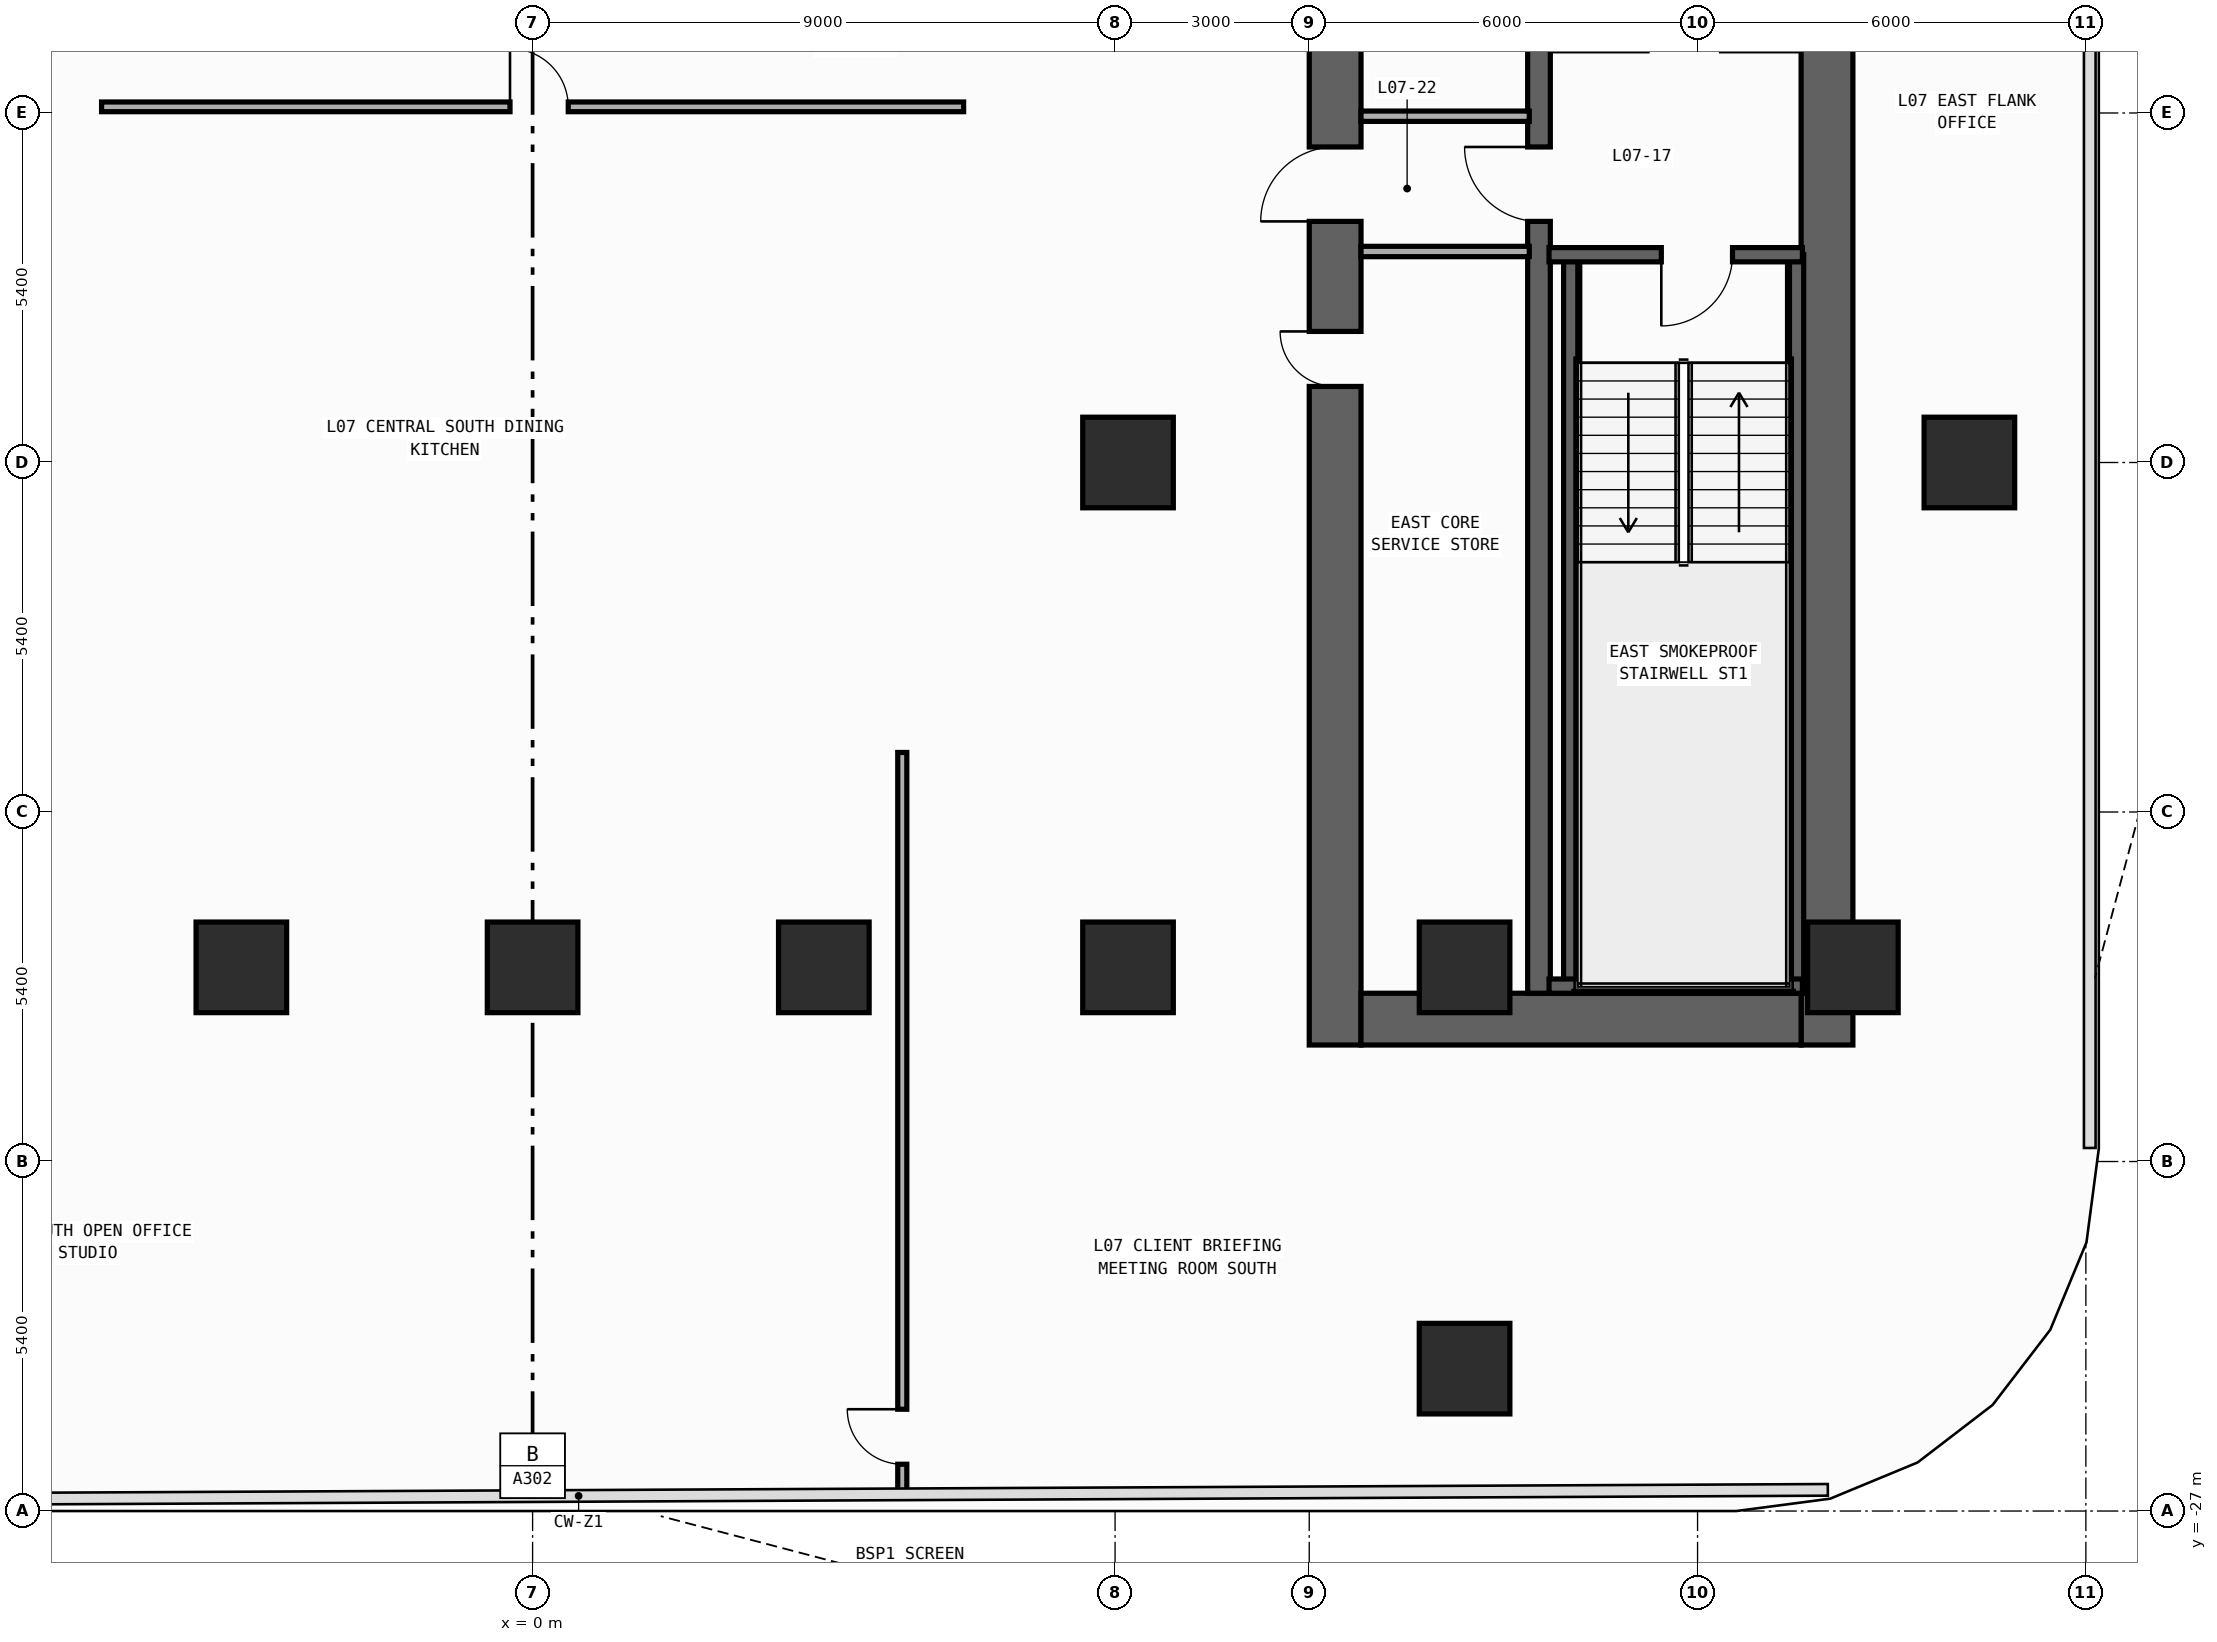
"""IFC4 building model, lengths in metres.
Left out: names, types, materials, properties, quantities, classifications, styles, units other than length and angle.
Written with IfcOpenShell. Run it as: python <this file> out.ifc"""

import sys

from ifc_helpers import new_model, si_unit, direction, frame, frame_2d, origin, origin_2d, place, context, subcontext, project, spatial, rectangle, extrude, element, fill, save


model = new_model("IFC4")
c1 = context("Model", 3, precision=1e-05, world=origin(), true_north=direction((0.0, 1.0)))
c2 = subcontext(c1, "Body", "Model", "MODEL_VIEW")
j1 = project(units=[si_unit("LENGTHUNIT", "METRE"), si_unit("PLANEANGLEUNIT", "RADIAN")], contexts=[c1])
p1 = place(None, origin())
s1 = spatial("IfcSite", under=j1, at=p1, CompositionType="ELEMENT")
p2 = place(p1, origin())
s2 = spatial("IfcBuilding", under=s1, at=p2, CompositionType="ELEMENT")
p3 = place(p2, frame((0.0, 0.0, 30.2)))
s3 = spatial("IfcBuildingStorey", under=s2, at=p3, CompositionType="ELEMENT", Elevation=30.2)
p4 = place(p3, frame((12.4, -19.8, 0.0), z_axis=(0.0, 0.0, 1.0), x_axis=(0.0, 1.0, 0.0)))
e1 = element("IfcWall", 1, at=p4, inside=s3, PredefinedType="SHEAR", context=c2, shape_type="SweptSolid", body=[
    extrude(rectangle(XDim=27.0, YDim=0.8, at=frame_2d((13.5, 0.0))), origin(), (0.0, 0.0, 1.0), 3.94),
])
p5 = place(p4, frame((23.05, 0.0, 0.0)))
e2 = element("IfcOpeningElement", 2, at=p5, cuts=e1, PredefinedType="OPENING", context=c2, shape_type="SweptSolid", body=[
    extrude(rectangle(XDim=1.1, YDim=2.2, at=frame_2d((0.55, 1.1))), frame((0.0, 0.41, 0.0), z_axis=(0.0, -1.0, 0.0), x_axis=(1.0, 0.0, 0.0)), (0.0, 0.0, 1.0), 0.82),
])
p6 = place(p4, frame((19.85, 0.0, 0.0)))
e3 = element("IfcOpeningElement", 3, at=p6, cuts=e1, PredefinedType="OPENING", context=c2, shape_type="SweptSolid", body=[
    extrude(rectangle(XDim=1.1, YDim=2.2, at=frame_2d((0.55, 1.1))), frame((0.0, 0.41, 0.0), z_axis=(0.0, -1.0, 0.0), x_axis=(1.0, 0.0, 0.0)), (0.0, 0.0, 1.0), 0.82),
])
p7 = place(p4, frame((16.65, 0.0, 0.0)))
e4 = element("IfcOpeningElement", 4, at=p7, cuts=e1, PredefinedType="OPENING", context=c2, shape_type="SweptSolid", body=[
    extrude(rectangle(XDim=1.1, YDim=2.2, at=frame_2d((0.55, 1.1))), frame((0.0, 0.41, 0.0), z_axis=(0.0, -1.0, 0.0), x_axis=(1.0, 0.0, 0.0)), (0.0, 0.0, 1.0), 0.82),
])
p8 = place(p4, frame((10.175, 0.0, 0.0)))
e5 = element("IfcOpeningElement", 5, at=p8, cuts=e1, PredefinedType="OPENING", context=c2, shape_type="SweptSolid", body=[
    extrude(rectangle(XDim=0.85, YDim=2.1, at=frame_2d((0.425, 1.05))), frame((0.0, 0.41, 0.0), z_axis=(0.0, -1.0, 0.0), x_axis=(1.0, 0.0, 0.0)), (0.0, 0.0, 1.0), 0.82),
])
p9 = place(p4, frame((12.725, 0.0, 0.0)))
e6 = element("IfcOpeningElement", 6, at=p9, cuts=e1, PredefinedType="OPENING", context=c2, shape_type="SweptSolid", body=[
    extrude(rectangle(XDim=1.15, YDim=2.2, at=frame_2d((0.575, 1.1))), frame((0.0, 0.41, 0.0), z_axis=(0.0, -1.0, 0.0), x_axis=(1.0, 0.0, 0.0)), (0.0, 0.0, 1.0), 0.82),
])
p10 = place(p4, frame((25.125, 0.0, 0.0)))
e7 = element("IfcOpeningElement", 7, at=p10, cuts=e1, PredefinedType="OPENING", context=c2, shape_type="SweptSolid", body=[
    extrude(rectangle(XDim=0.85, YDim=2.1, at=frame_2d((0.425, 1.05))), frame((0.0, 0.41, 0.0), z_axis=(0.0, -1.0, 0.0), x_axis=(1.0, 0.0, 0.0)), (0.0, 0.0, 1.0), 0.82),
])
p11 = place(p3, frame((20.0, -19.8, 0.0), z_axis=(0.0, 0.0, 1.0), x_axis=(0.0, 1.0, 0.0)))
e8 = element("IfcWall", 8, at=p11, inside=s3, PredefinedType="SHEAR", context=c2, shape_type="SweptSolid", body=[
    extrude(rectangle(XDim=27.0, YDim=0.8, at=frame_2d((13.5, 0.0))), origin(), (0.0, 0.0, 1.0), 3.94),
])
p12 = place(p3, frame((12.8, -19.4, 0.0), z_axis=(0.0, 0.0, 1.0), x_axis=(1.0, 0.0, 0.0)))
e9 = element("IfcWall", 9, at=p12, inside=s3, PredefinedType="SHEAR", context=c2, shape_type="SweptSolid", body=[
    extrude(rectangle(XDim=6.8, YDim=0.8, at=frame_2d((3.4, 0.0))), origin(), (0.0, 0.0, 1.0), 3.94),
])
p13 = place(p3, frame((15.55, -19.0, 0.0), z_axis=(0.0, 0.0, 1.0), x_axis=(0.0, 1.0, 0.0)))
e10 = element("IfcWall", 10, at=p13, inside=s3, PredefinedType="SHEAR", context=c2, shape_type="SweptSolid", body=[
    extrude(rectangle(XDim=25.4, YDim=0.35, at=frame_2d((12.7, 0.0))), origin(), (0.0, 0.0, 1.0), 3.94),
])
p14 = place(p13, frame((11.925, 0.0, 0.0)))
e11 = element("IfcOpeningElement", 11, at=p14, cuts=e10, PredefinedType="OPENING", context=c2, shape_type="SweptSolid", body=[
    extrude(rectangle(XDim=1.15, YDim=2.2, at=frame_2d((0.575, 1.1))), frame((0.0, 0.185, 0.0), z_axis=(0.0, -1.0, 0.0), x_axis=(1.0, 0.0, 0.0)), (0.0, 0.0, 1.0), 0.37),
])
p15 = place(p13, frame((24.325, 0.0, 0.0)))
e12 = element("IfcOpeningElement", 12, at=p15, cuts=e10, PredefinedType="OPENING", context=c2, shape_type="SweptSolid", body=[
    extrude(rectangle(XDim=0.85, YDim=2.1, at=frame_2d((0.425, 1.05))), frame((0.0, 0.185, 0.0), z_axis=(0.0, -1.0, 0.0), x_axis=(1.0, 0.0, 0.0)), (0.0, 0.0, 1.0), 0.37),
])
for number, where, z_axis, x_axis in (
    (13, (16.04, -18.89, 0.0), (0.0, 0.0, 1.0), (0.0, 1.0, 0.0)),
    (14, (19.53, -18.89, 0.0), (0.0, 0.0, 1.0), (0.0, 1.0, 0.0)),
):
    element("IfcWall", number, at=place(p3, frame(where, z_axis=z_axis, x_axis=x_axis)), inside=s3, PredefinedType="SHEAR", context=c2, shape_type="SweptSolid", body=[
        extrude(rectangle(XDim=11.3, YDim=0.22, at=frame_2d((5.65, 0.0))), origin(), (0.0, 0.0, 1.0), 3.94),
    ])
p16 = place(p3, frame((15.705, -18.89, 0.0), z_axis=(0.0, 0.0, 1.0), x_axis=(1.0, 0.0, 0.0)))
e15 = element("IfcWall", 15, at=p16, inside=s3, PredefinedType="SHEAR", context=c2, shape_type="SweptSolid", body=[
    extrude(rectangle(XDim=3.915, YDim=0.22, at=frame_2d((1.958, 0.0))), origin(), (0.0, 0.0, 1.0), 3.94),
])
p17 = place(p3, frame((19.62, -7.59, 0.0), z_axis=(0.0, 0.0, 1.0), x_axis=(-1.0, 0.0, 0.0)))
e16 = element("IfcWall", 16, at=p17, inside=s3, PredefinedType="SHEAR", context=c2, shape_type="SweptSolid", body=[
    extrude(rectangle(XDim=3.915, YDim=0.22, at=frame_2d((1.958, 0.0))), origin(), (0.0, 0.0, 1.0), 3.94),
])
p18 = place(p17, frame((1.08, 0.0, 0.0)))
e17 = element("IfcOpeningElement", 17, at=p18, cuts=e16, PredefinedType="OPENING", context=c2, shape_type="SweptSolid", body=[
    extrude(rectangle(XDim=1.1, YDim=2.2, at=frame_2d((0.55, 1.1))), frame((0.0, 0.12, 0.0), z_axis=(0.0, -1.0, 0.0), x_axis=(1.0, 0.0, 0.0)), (0.0, 0.0, 1.0), 0.24),
])
for number, where, z_axis, x_axis in (
    (18, (9.2, -18.6, 0.0), (0.0, 0.0, 1.0), (1.0, 0.0, 0.0)),
    (19, (9.2, -10.8, 0.0), (0.0, 0.0, 1.0), (1.0, 0.0, 0.0)),
    (20, (20.4, -18.6, 0.0), (0.0, 0.0, 1.0), (1.0, 0.0, 0.0)),
    (21, (14.4, -18.6, 0.0), (0.0, 0.0, 1.0), (1.0, 0.0, 0.0)),
    (22, (-4.5, -18.6, 0.0), (0.0, 0.0, 1.0), (1.0, 0.0, 0.0)),
    (23, (0.0, -18.6, 0.0), (0.0, 0.0, 1.0), (1.0, 0.0, 0.0)),
    (24, (4.5, -18.6, 0.0), (0.0, 0.0, 1.0), (1.0, 0.0, 0.0)),
    (25, (22.2, -10.8, 0.0), (0.0, 0.0, 1.0), (1.0, 0.0, 0.0)),
    (26, (14.4, -24.8, 0.0), (0.0, 0.0, 1.0), (1.0, 0.0, 0.0)),
):
    element("IfcColumn", number, at=place(p3, frame(where, z_axis=z_axis, x_axis=x_axis)), inside=s3, PredefinedType="COLUMN", context=c2, shape_type="SweptSolid", body=[
        extrude(rectangle(XDim=1.4, YDim=1.4, at=origin_2d()), origin(), (0.0, 0.0, 1.0), 4.2),
    ])
for number, where, z_axis, x_axis in (
    (27, (12.8, -5.45, 0.0), (0.0, 0.0, 1.0), (1.0, 0.0, 0.0)),
    (28, (12.8, -7.54, 0.0), (0.0, 0.0, 1.0), (1.0, 0.0, 0.0)),
):
    element("IfcWall", number, at=place(p3, frame(where, z_axis=z_axis, x_axis=x_axis)), inside=s3, PredefinedType="STANDARD", context=c2, shape_type="SweptSolid", body=[
        extrude(rectangle(XDim=2.6, YDim=0.16, at=frame_2d((1.3, 0.0))), origin(), (0.0, 0.0, 1.0), 3.94),
    ])
p19 = place(p3, frame((-6.66, -5.305, 0.0), z_axis=(0.0, 0.0, 1.0), x_axis=(1.0, 0.0, 0.0)))
e29 = element("IfcWall", 29, at=p19, inside=s3, PredefinedType="PARTITIONING", context=c2, shape_type="SweptSolid", body=[
    extrude(rectangle(XDim=13.32, YDim=0.15, at=frame_2d((6.66, 0.0))), origin(), (0.0, 0.0, 1.0), 3.94),
])
p20 = place(p19, frame((6.311, 0.0, 0.0)))
e30 = element("IfcOpeningElement", 30, at=p20, cuts=e29, PredefinedType="OPENING", context=c2, shape_type="SweptSolid", body=[
    extrude(rectangle(XDim=0.9, YDim=2.15, at=frame_2d((0.45, 1.075))), frame((0.0, 0.085, 0.0), z_axis=(0.0, -1.0, 0.0), x_axis=(1.0, 0.0, 0.0)), (0.0, 0.0, 1.0), 0.17),
])
p21 = place(p3, frame((5.712, -26.737, 0.0), z_axis=(0.0, 0.0, 1.0), x_axis=(0.0, 1.0, 0.0)))
e31 = element("IfcWall", 31, at=p21, inside=s3, PredefinedType="PARTITIONING", context=c2, shape_type="SweptSolid", body=[
    extrude(rectangle(XDim=11.457, YDim=0.14, at=frame_2d((5.729, 0.0))), origin(), (0.0, 0.0, 1.0), 3.94),
])
p22 = place(p21, frame((0.46, 0.0, 0.0)))
e32 = element("IfcOpeningElement", 32, at=p22, cuts=e31, PredefinedType="OPENING", context=c2, shape_type="SweptSolid", body=[
    extrude(rectangle(XDim=0.85, YDim=2.1, at=frame_2d((0.425, 1.05))), frame((0.0, 0.08, 0.0), z_axis=(0.0, -1.0, 0.0), x_axis=(1.0, 0.0, 0.0)), (0.0, 0.0, 1.0), 0.16),
])
p23 = place(p18, origin())
e33 = element("IfcDoor", 33, at=p23, inside=s3, OperationType="SINGLE_SWING_RIGHT", PredefinedType="DOOR", context=c2, shape_type="SweptSolid", body=[
    extrude(rectangle(XDim=1.1, YDim=2.2, at=frame_2d((0.55, 1.1))), frame((0.0, 0.025, 0.0), z_axis=(0.0, -1.0, 0.0), x_axis=(1.0, 0.0, 0.0)), (0.0, 0.0, 1.0), 0.05),
])
fill(e17, e33)
p24 = place(p8, origin())
e34 = element("IfcDoor", 34, at=p24, inside=s3, OperationType="SINGLE_SWING_RIGHT", PredefinedType="DOOR", context=c2, shape_type="SweptSolid", body=[
    extrude(rectangle(XDim=0.85, YDim=2.1, at=frame_2d((0.425, 1.05))), frame((0.0, 0.025, 0.0), z_axis=(0.0, -1.0, 0.0), x_axis=(1.0, 0.0, 0.0)), (0.0, 0.0, 1.0), 0.05),
])
fill(e5, e34)
p25 = place(p9, origin())
e35 = element("IfcDoor", 35, at=p25, inside=s3, OperationType="SINGLE_SWING_LEFT", PredefinedType="DOOR", context=c2, shape_type="SweptSolid", body=[
    extrude(rectangle(XDim=1.15, YDim=2.2, at=frame_2d((0.575, 1.1))), frame((0.0, 0.025, 0.0), z_axis=(0.0, -1.0, 0.0), x_axis=(1.0, 0.0, 0.0)), (0.0, 0.0, 1.0), 0.05),
])
fill(e6, e35)
p26 = place(p14, origin())
e36 = element("IfcDoor", 36, at=p26, inside=s3, OperationType="SINGLE_SWING_RIGHT", PredefinedType="DOOR", context=c2, shape_type="SweptSolid", body=[
    extrude(rectangle(XDim=1.15, YDim=2.2, at=frame_2d((0.575, 1.1))), frame((0.0, 0.025, 0.0), z_axis=(0.0, -1.0, 0.0), x_axis=(1.0, 0.0, 0.0)), (0.0, 0.0, 1.0), 0.05),
])
fill(e11, e36)
p27 = place(p20, origin())
e37 = element("IfcDoor", 37, at=p27, inside=s3, OperationType="SINGLE_SWING_LEFT", PredefinedType="DOOR", context=c2, shape_type="SweptSolid", body=[
    extrude(rectangle(XDim=0.9, YDim=2.15, at=frame_2d((0.45, 1.075))), frame((0.0, 0.025, 0.0), z_axis=(0.0, -1.0, 0.0), x_axis=(1.0, 0.0, 0.0)), (0.0, 0.0, 1.0), 0.05),
])
fill(e30, e37)
p28 = place(p22, origin())
e38 = element("IfcDoor", 38, at=p28, inside=s3, OperationType="SINGLE_SWING_RIGHT", PredefinedType="DOOR", context=c2, shape_type="SweptSolid", body=[
    extrude(rectangle(XDim=0.85, YDim=2.1, at=frame_2d((0.425, 1.05))), frame((0.0, 0.025, 0.0), z_axis=(0.0, -1.0, 0.0), x_axis=(1.0, 0.0, 0.0)), (0.0, 0.0, 1.0), 0.05),
])
fill(e32, e38)
save(model, sys.argv[1])
